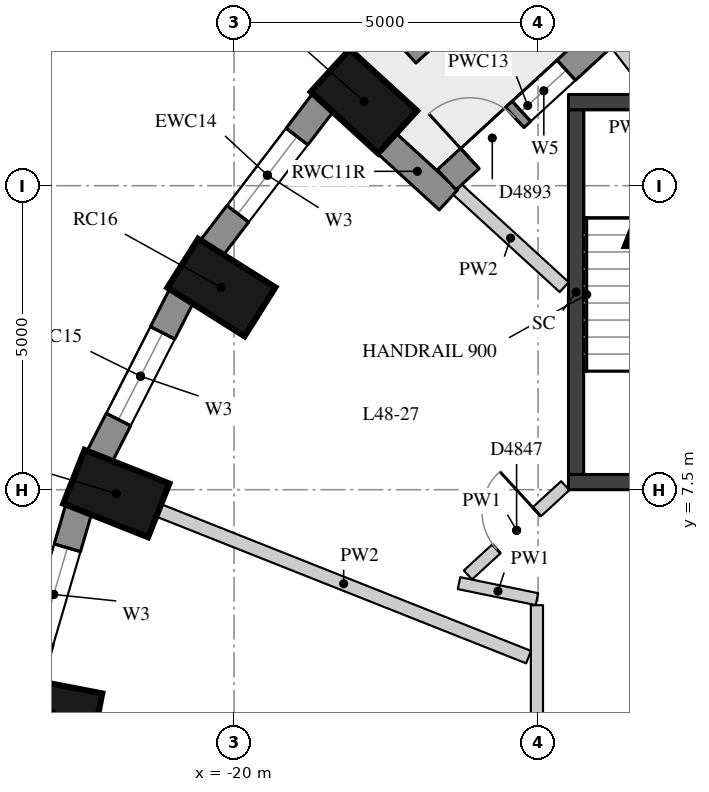
"""IFC4 building model, lengths in metres.
Left out: names, types, materials, properties, quantities, classifications, styles, units other than length and angle.
Written with IfcOpenShell. Run it as: python <this file> out.ifc"""

import sys

from ifc_helpers import new_model, si_unit, direction, frame, frame_2d, origin, origin_2d, place, context, subcontext, project, spatial, rectangle, extrude, element, fill, save


model = new_model("IFC4")
c1 = context("Model", 3, precision=1e-05, world=origin(), true_north=direction((0.0, 1.0)))
c2 = subcontext(c1, "Body", "Model", "MODEL_VIEW")
j1 = project(units=[si_unit("LENGTHUNIT", "METRE"), si_unit("PLANEANGLEUNIT", "RADIAN")], contexts=[c1])
p1 = place(None, origin())
s1 = spatial("IfcSite", under=j1, at=p1, CompositionType="ELEMENT")
p2 = place(p1, origin())
s2 = spatial("IfcBuilding", under=s1, at=p2, CompositionType="ELEMENT")
p3 = place(p2, frame((0.0, 0.0, 171.5)))
s3 = spatial("IfcBuildingStorey", under=s2, at=p3, CompositionType="ELEMENT", Elevation=171.5)
for number, where, z_axis, x_axis in (
    (1, (-17.864, 13.888, 0.0), (0.0, 0.0, 1.0), (-0.738, 0.675, 0.0)),
    (2, (-20.208, 10.825, 0.0), (0.0, 0.0, 1.0), (-0.846, 0.533, 0.0)),
    (3, (-21.936, 7.436, 0.0), (0.0, 0.0, 1.0), (-0.93, 0.369, 0.0)),
    (4, (-22.994, 3.825, 0.0), (0.0, 0.0, 1.0), (-0.982, 0.189, 0.0)),
):
    element("IfcColumn", number, at=place(p3, frame(where, z_axis=z_axis, x_axis=x_axis)), inside=s3, PredefinedType="COLUMN", context=c2, shape_type="SweptSolid", body=[
        extrude(rectangle(XDim=1.5, YDim=0.95, at=origin_2d()), origin(), (0.0, 0.0, 1.0), 3.3),
    ])
p4 = place(p3, frame((-18.528, 13.879, 0.0), z_axis=(0.0, 0.0, 1.0), x_axis=(-0.607817056371, -0.794077090706, 0.0)))
e5 = element("IfcWall", 5, at=p4, inside=s3, PredefinedType="SOLIDWALL", context=c2, shape_type="SweptSolid", body=[
    extrude(rectangle(XDim=3.037, YDim=0.45, at=frame_2d((1.519, 0.0))), origin(), (0.0, 0.0, 1.0), 3.02),
])
p5 = place(p4, frame((0.719, 0.0, 0.4)))
e6 = element("IfcOpeningElement", 6, at=p5, cuts=e5, PredefinedType="OPENING", context=c2, shape_type="SweptSolid", body=[
    extrude(rectangle(XDim=1.6, YDim=1.75, at=frame_2d((0.8, 0.875))), frame((0.0, 0.235, 0.0), z_axis=(0.0, -1.0, 0.0), x_axis=(1.0, 0.0, 0.0)), (0.0, 0.0, 1.0), 0.47),
])
p6 = place(p3, frame((-20.859, 10.697, 0.0), z_axis=(0.0, 0.0, 1.0), x_axis=(-0.454133999889, -0.890933392653, 0.0)))
e7 = element("IfcWall", 7, at=p6, inside=s3, PredefinedType="SOLIDWALL", context=c2, shape_type="SweptSolid", body=[
    extrude(rectangle(XDim=2.986, YDim=0.45, at=frame_2d((1.493, 0.0))), origin(), (0.0, 0.0, 1.0), 3.02),
])
p7 = place(p6, frame((0.693, 0.0, 0.4)))
e8 = element("IfcOpeningElement", 8, at=p7, cuts=e7, PredefinedType="OPENING", context=c2, shape_type="SweptSolid", body=[
    extrude(rectangle(XDim=1.6, YDim=1.75, at=frame_2d((0.8, 0.875))), frame((0.0, 0.235, 0.0), z_axis=(0.0, -1.0, 0.0), x_axis=(1.0, 0.0, 0.0)), (0.0, 0.0, 1.0), 0.47),
])
p8 = place(p3, frame((-22.551, 7.191, 0.0), z_axis=(0.0, 0.0, 1.0), x_axis=(-0.281125768296, -0.959670934435, 0.0)))
e9 = element("IfcWall", 9, at=p8, inside=s3, PredefinedType="SOLIDWALL", context=c2, shape_type="SweptSolid", body=[
    extrude(rectangle(XDim=2.948, YDim=0.45, at=frame_2d((1.474, 0.0))), origin(), (0.0, 0.0, 1.0), 3.02),
])
p9 = place(p8, frame((0.674, 0.0, 0.4)))
e10 = element("IfcOpeningElement", 10, at=p9, cuts=e9, PredefinedType="OPENING", context=c2, shape_type="SweptSolid", body=[
    extrude(rectangle(XDim=1.6, YDim=1.75, at=frame_2d((0.8, 0.875))), frame((0.0, 0.235, 0.0), z_axis=(0.0, -1.0, 0.0), x_axis=(1.0, 0.0, 0.0)), (0.0, 0.0, 1.0), 0.47),
])
p10 = place(p3, frame((-17.499, 13.205, 0.0), z_axis=(0.0, 0.0, 1.0), x_axis=(0.737918885826, -0.674889411638, 0.0)))
e11 = element("IfcWall", 11, at=p10, inside=s3, PredefinedType="SOLIDWALL", context=c2, shape_type="SweptSolid", body=[
    extrude(rectangle(XDim=1.391, YDim=0.45, at=frame_2d((0.695, 0.0))), origin(), (0.0, 0.0, 1.0), 3.02),
])
p11 = place(p3, frame((-13.839, 15.039, 0.0), z_axis=(0.0, 0.0, 1.0), x_axis=(-0.736971705023, -0.675923594791, 0.0)))
e12 = element("IfcWall", 12, at=p11, inside=s3, PredefinedType="SOLIDWALL", context=c2, shape_type="SweptSolid", body=[
    extrude(rectangle(XDim=3.611, YDim=0.45, at=frame_2d((1.806, 0.0))), origin(), (0.0, 0.0, 1.0), 3.02),
])
p12 = place(p11, frame((0.946, 0.0, 0.4)))
e13 = element("IfcOpeningElement", 13, at=p12, cuts=e12, PredefinedType="OPENING", context=c2, shape_type="SweptSolid", body=[
    extrude(rectangle(XDim=1.0, YDim=1.75, at=frame_2d((0.5, 0.875))), frame((0.0, 0.235, 0.0), z_axis=(0.0, -1.0, 0.0), x_axis=(1.0, 0.0, 0.0)), (0.0, 0.0, 1.0), 0.47),
])
p13 = place(p11, frame((2.096, 0.0, 0.0)))
e14 = element("IfcOpeningElement", 14, at=p13, cuts=e12, PredefinedType="OPENING", context=c2, shape_type="SweptSolid", body=[
    extrude(rectangle(XDim=1.0, YDim=2.15, at=frame_2d((0.5, 1.075))), frame((0.0, 0.235, 0.0), z_axis=(0.0, -1.0, 0.0), x_axis=(1.0, 0.0, 0.0)), (0.0, 0.0, 1.0), 0.47),
])
p14 = place(p3, frame((-15.916, 15.991, 0.0), z_axis=(0.0, 0.0, 1.0), x_axis=(-0.737874397391, -0.674938051731, 0.0)))
e15 = element("IfcWall", 15, at=p14, inside=s3, PredefinedType="USERDEFINED", context=c2, shape_type="SweptSolid", body=[
    extrude(rectangle(XDim=1.8, YDim=0.7, at=frame_2d((0.9, 0.0))), origin(), (0.0, 0.0, 1.0), 0.75),
])
p15 = place(p3, frame((-14.375, 7.75, -0.28), z_axis=(0.0, 0.0, 1.0), x_axis=(0.0, 1.0, 0.0)))
e16 = element("IfcWall", 16, at=p15, inside=s3, PredefinedType="SHEAR", context=c2, shape_type="SweptSolid", body=[
    extrude(rectangle(XDim=6.0, YDim=0.25, at=frame_2d((3.0, 0.0))), origin(), (0.0, 0.0, 1.0), 3.3),
])
for number, where, z_axis, x_axis in (
    (17, (-14.5, 13.875, -0.28), (0.0, 0.0, 1.0), (1.0, 0.0, 0.0)),
    (18, (-14.5, 7.625, -0.28), (0.0, 0.0, 1.0), (1.0, 0.0, 0.0)),
):
    element("IfcWall", number, at=place(p3, frame(where, z_axis=z_axis, x_axis=x_axis)), inside=s3, PredefinedType="SHEAR", context=c2, shape_type="SweptSolid", body=[
        extrude(rectangle(XDim=5.2, YDim=0.25, at=frame_2d((2.6, 0.0))), origin(), (0.0, 0.0, 1.0), 3.3),
    ])
p16 = place(p3, frame((-15.019, 5.7, 0.0), z_axis=(0.0, 0.0, 1.0), x_axis=(-0.979555577822, 0.201173730785, 0.0)))
e19 = element("IfcWall", 19, at=p16, inside=s3, PredefinedType="PARTITIONING", context=c2, shape_type="SweptSolid", body=[
    extrude(rectangle(XDim=1.308, YDim=0.2, at=frame_2d((0.654, 0.0))), origin(), (0.0, 0.0, 1.0), 3.02),
])
p17 = place(p3, frame((-16.154, 6.097, 0.0), z_axis=(0.0, 0.0, 1.0), x_axis=(0.736958194284, 0.675938325498, 0.0)))
e20 = element("IfcWall", 20, at=p17, inside=s3, PredefinedType="PARTITIONING", context=c2, shape_type="SweptSolid", body=[
    extrude(rectangle(XDim=2.173, YDim=0.2, at=frame_2d((1.086, 0.0))), origin(), (0.0, 0.0, 1.0), 3.02),
])
p18 = place(p17, frame((0.636, 0.0, 0.0)))
e21 = element("IfcOpeningElement", 21, at=p18, cuts=e20, PredefinedType="OPENING", context=c2, shape_type="SweptSolid", body=[
    extrude(rectangle(XDim=0.9, YDim=2.1, at=frame_2d((0.45, 1.05))), frame((0.0, 0.11, 0.0), z_axis=(0.0, -1.0, 0.0), x_axis=(1.0, 0.0, 0.0)), (0.0, 0.0, 1.0), 0.22),
])
p19 = place(p3, frame((-15.019, -5.6, 0.0), z_axis=(0.0, 0.0, 1.0), x_axis=(0.0, 1.0, 0.0)))
e22 = element("IfcWall", 22, at=p19, inside=s3, PredefinedType="PARTITIONING", context=c2, shape_type="SweptSolid", body=[
    extrude(rectangle(XDim=11.2, YDim=0.2, at=frame_2d((5.6, 0.0))), origin(), (0.0, 0.0, 1.0), 2.52),
])
p20 = place(p19, frame((6.436, 0.0, 0.0)))
e23 = element("IfcOpeningElement", 23, at=p20, cuts=e22, PredefinedType="OPENING", context=c2, shape_type="SweptSolid", body=[
    extrude(rectangle(XDim=1.1, YDim=2.1, at=frame_2d((0.55, 1.05))), frame((0.0, 0.11, 0.0), z_axis=(0.0, -1.0, 0.0), x_axis=(1.0, 0.0, 0.0)), (0.0, 0.0, 1.0), 0.22),
])
p21 = place(p19, frame((3.663, 0.0, 0.0)))
e24 = element("IfcOpeningElement", 24, at=p21, cuts=e22, PredefinedType="OPENING", context=c2, shape_type="SweptSolid", body=[
    extrude(rectangle(XDim=1.1, YDim=2.1, at=frame_2d((0.55, 1.05))), frame((0.0, 0.11, 0.0), z_axis=(0.0, -1.0, 0.0), x_axis=(1.0, 0.0, 0.0)), (0.0, 0.0, 1.0), 0.22),
])
p22 = place(p3, frame((-13.716, 14.846, 0.0), z_axis=(0.0, 0.0, 1.0), x_axis=(0.609971806764, -0.792423116115, 0.0)))
e25 = element("IfcWall", 25, at=p22, inside=s3, PredefinedType="PARTITIONING", context=c2, shape_type="SweptSolid", body=[
    extrude(rectangle(XDim=0.994, YDim=0.22, at=frame_2d((0.497, 0.0))), origin(), (0.0, 0.0, 1.0), 2.57),
])
p23 = place(p3, frame((-16.334, 12.445, 0.0), z_axis=(0.0, 0.0, 1.0), x_axis=(0.737857346278, -0.674956692347, 0.0)))
e26 = element("IfcWall", 26, at=p23, inside=s3, PredefinedType="PARTITIONING", context=c2, shape_type="SweptSolid", body=[
    extrude(rectangle(XDim=2.391, YDim=0.22, at=frame_2d((1.195, 0.0))), origin(), (0.0, 0.0, 1.0), 3.02),
])
p24 = place(p3, frame((-21.239, 7.16, 0.0), z_axis=(0.0, 0.0, 1.0), x_axis=(0.929520145478, -0.368771337215, 0.0)))
e27 = element("IfcWall", 27, at=p24, inside=s3, PredefinedType="PARTITIONING", context=c2, shape_type="SweptSolid", body=[
    extrude(rectangle(XDim=6.544, YDim=0.22, at=frame_2d((3.272, 0.0))), origin(), (0.0, 0.0, 1.0), 3.02),
])
p25 = place(p3, frame((-13.554, 0.0, 0.0), z_axis=(0.0, 0.0, 1.0), x_axis=(0.382730523909, 0.923860025149, 0.0)))
e28 = element("IfcWall", 28, at=p25, inside=s3, PredefinedType="PARTITIONING", context=c2, shape_type="SweptSolid", body=[
    extrude(rectangle(XDim=4.251, YDim=0.1, at=frame_2d((2.125, 0.0))), origin(), (0.0, 0.0, 1.0), 3.02),
])
p26 = place(p5, origin())
e29 = element("IfcWindow", 29, at=p26, inside=s3, PartitioningType="SINGLE_PANEL", PredefinedType="WINDOW", context=c2, shape_type="SweptSolid", body=[
    extrude(rectangle(XDim=1.6, YDim=1.75, at=frame_2d((0.8, 0.875))), frame((0.0, 0.035, 0.0), z_axis=(0.0, -1.0, 0.0), x_axis=(1.0, 0.0, 0.0)), (0.0, 0.0, 1.0), 0.06),
])
fill(e6, e29)
p27 = place(p7, origin())
e30 = element("IfcWindow", 30, at=p27, inside=s3, PartitioningType="SINGLE_PANEL", PredefinedType="WINDOW", context=c2, shape_type="SweptSolid", body=[
    extrude(rectangle(XDim=1.6, YDim=1.75, at=frame_2d((0.8, 0.875))), frame((0.0, 0.035, 0.0), z_axis=(0.0, -1.0, 0.0), x_axis=(1.0, 0.0, 0.0)), (0.0, 0.0, 1.0), 0.06),
])
fill(e8, e30)
p28 = place(p9, origin())
e31 = element("IfcWindow", 31, at=p28, inside=s3, PartitioningType="SINGLE_PANEL", PredefinedType="WINDOW", context=c2, shape_type="SweptSolid", body=[
    extrude(rectangle(XDim=1.6, YDim=1.75, at=frame_2d((0.8, 0.875))), frame((0.0, 0.035, 0.0), z_axis=(0.0, -1.0, 0.0), x_axis=(1.0, 0.0, 0.0)), (0.0, 0.0, 1.0), 0.06),
])
fill(e10, e31)
p29 = place(p12, origin())
e32 = element("IfcWindow", 32, at=p29, inside=s3, PartitioningType="SINGLE_PANEL", PredefinedType="WINDOW", context=c2, shape_type="SweptSolid", body=[
    extrude(rectangle(XDim=1.0, YDim=1.75, at=frame_2d((0.5, 0.875))), frame((0.0, 0.035, 0.0), z_axis=(0.0, -1.0, 0.0), x_axis=(1.0, 0.0, 0.0)), (0.0, 0.0, 1.0), 0.06),
])
fill(e13, e32)
p30 = place(p13, origin())
e33 = element("IfcDoor", 33, at=p30, inside=s3, OperationType="SINGLE_SWING_LEFT", PredefinedType="DOOR", context=c2, shape_type="SweptSolid", body=[
    extrude(rectangle(XDim=1.0, YDim=2.15, at=frame_2d((0.5, 1.075))), frame((0.0, -0.025, 0.0), z_axis=(0.0, -1.0, 0.0), x_axis=(1.0, 0.0, 0.0)), (0.0, 0.0, 1.0), 0.05),
])
fill(e14, e33)
p31 = place(p18, origin())
e34 = element("IfcDoor", 34, at=p31, inside=s3, OperationType="SINGLE_SWING_RIGHT", PredefinedType="DOOR", context=c2, shape_type="SweptSolid", body=[
    extrude(rectangle(XDim=0.9, YDim=2.1, at=frame_2d((0.45, 1.05))), frame((0.0, 0.025, 0.0), z_axis=(0.0, -1.0, 0.0), x_axis=(1.0, 0.0, 0.0)), (0.0, 0.0, 1.0), 0.05),
])
fill(e21, e34)
save(model, sys.argv[1])
